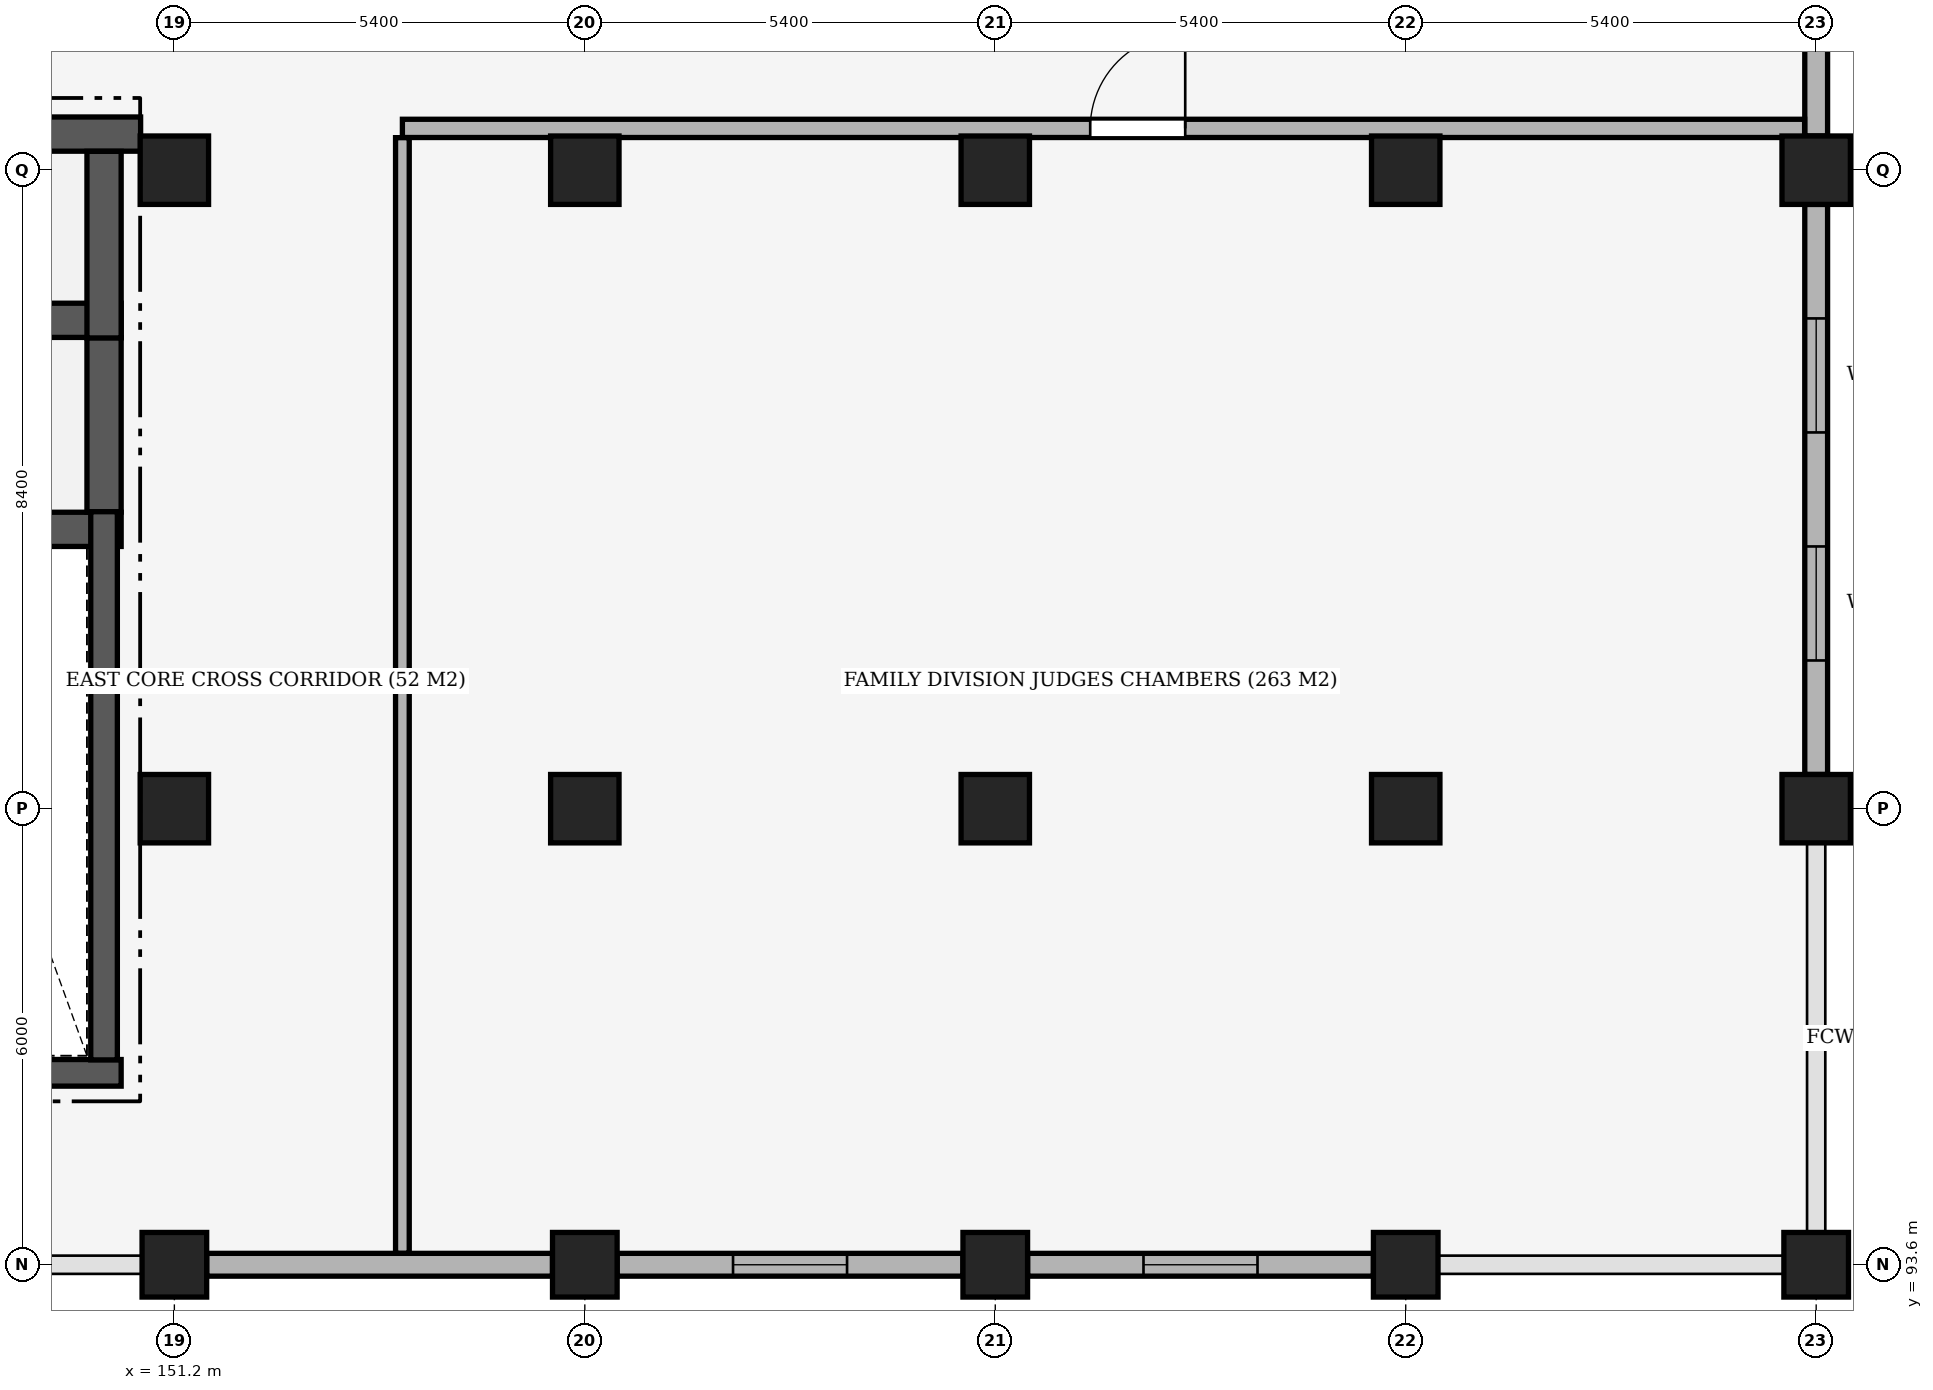
"""IFC4 building model, lengths in metres.
Left out: names, types, materials, properties, quantities, classifications, styles, units other than length and angle.
Written with IfcOpenShell. Run it as: python <this file> out.ifc"""

import sys

from ifc_helpers import new_model, si_unit, direction, frame, frame_2d, origin, origin_2d, place, context, subcontext, project, spatial, rectangle, extrude, element, fill, save


model = new_model("IFC4")
c1 = context("Model", 3, precision=1e-05, world=origin(), true_north=direction((0.0, 1.0)))
c2 = subcontext(c1, "Body", "Model", "MODEL_VIEW")
j1 = project(units=[si_unit("LENGTHUNIT", "METRE"), si_unit("PLANEANGLEUNIT", "RADIAN")], contexts=[c1])
p1 = place(None, origin())
s1 = spatial("IfcSite", under=j1, at=p1, CompositionType="ELEMENT")
p2 = place(p1, origin())
s2 = spatial("IfcBuilding", under=s1, at=p2, CompositionType="ELEMENT")
p3 = place(p2, frame((0.0, 0.0, 5.1)))
s3 = spatial("IfcBuildingStorey", under=s2, at=p3, CompositionType="ELEMENT", Elevation=5.1)
p4 = place(p3, frame((151.2, 93.6, 0.0), z_axis=(0.0, 0.0, 1.0), x_axis=(1.0, 0.0, 0.0)))
e1 = element("IfcColumn", 1, at=p4, inside=s3, PredefinedType="COLUMN", context=c2, shape_type="SweptSolid", body=[
    extrude(rectangle(XDim=0.85, YDim=0.85, at=origin_2d()), origin(), (0.0, 0.0, 1.0), 5.1),
])
for number, where, z_axis, x_axis in (
    (2, (151.2, 99.6, 0.0), (0.0, 0.0, 1.0), (1.0, 0.0, 0.0)),
    (3, (151.2, 108.0, 0.0), (0.0, 0.0, 1.0), (1.0, 0.0, 0.0)),
):
    element("IfcColumn", number, at=place(p3, frame(where, z_axis=z_axis, x_axis=x_axis)), inside=s3, PredefinedType="COLUMN", context=c2, shape_type="SweptSolid", body=[
        extrude(rectangle(XDim=0.9, YDim=0.9, at=origin_2d()), origin(), (0.0, 0.0, 1.0), 5.1),
    ])
p5 = place(p3, frame((156.6, 93.6, 0.0), z_axis=(0.0, 0.0, 1.0), x_axis=(1.0, 0.0, 0.0)))
e4 = element("IfcColumn", 4, at=p5, inside=s3, PredefinedType="COLUMN", context=c2, shape_type="SweptSolid", body=[
    extrude(rectangle(XDim=0.85, YDim=0.85, at=origin_2d()), origin(), (0.0, 0.0, 1.0), 5.1),
])
for number, where, z_axis, x_axis in (
    (5, (156.6, 99.6, 0.0), (0.0, 0.0, 1.0), (1.0, 0.0, 0.0)),
    (6, (156.6, 108.0, 0.0), (0.0, 0.0, 1.0), (1.0, 0.0, 0.0)),
):
    element("IfcColumn", number, at=place(p3, frame(where, z_axis=z_axis, x_axis=x_axis)), inside=s3, PredefinedType="COLUMN", context=c2, shape_type="SweptSolid", body=[
        extrude(rectangle(XDim=0.9, YDim=0.9, at=origin_2d()), origin(), (0.0, 0.0, 1.0), 5.1),
    ])
p6 = place(p3, frame((162.0, 93.6, 0.0), z_axis=(0.0, 0.0, 1.0), x_axis=(1.0, 0.0, 0.0)))
e7 = element("IfcColumn", 7, at=p6, inside=s3, PredefinedType="COLUMN", context=c2, shape_type="SweptSolid", body=[
    extrude(rectangle(XDim=0.85, YDim=0.85, at=origin_2d()), origin(), (0.0, 0.0, 1.0), 5.1),
])
for number, where, z_axis, x_axis in (
    (8, (162.0, 99.6, 0.0), (0.0, 0.0, 1.0), (1.0, 0.0, 0.0)),
    (9, (162.0, 108.0, 0.0), (0.0, 0.0, 1.0), (1.0, 0.0, 0.0)),
):
    element("IfcColumn", number, at=place(p3, frame(where, z_axis=z_axis, x_axis=x_axis)), inside=s3, PredefinedType="COLUMN", context=c2, shape_type="SweptSolid", body=[
        extrude(rectangle(XDim=0.9, YDim=0.9, at=origin_2d()), origin(), (0.0, 0.0, 1.0), 5.1),
    ])
p7 = place(p3, frame((167.4, 93.6, 0.0), z_axis=(0.0, 0.0, 1.0), x_axis=(1.0, 0.0, 0.0)))
e10 = element("IfcColumn", 10, at=p7, inside=s3, PredefinedType="COLUMN", context=c2, shape_type="SweptSolid", body=[
    extrude(rectangle(XDim=0.85, YDim=0.85, at=origin_2d()), origin(), (0.0, 0.0, 1.0), 5.1),
])
for number, where, z_axis, x_axis in (
    (11, (167.4, 99.6, 0.0), (0.0, 0.0, 1.0), (1.0, 0.0, 0.0)),
    (12, (167.4, 108.0, 0.0), (0.0, 0.0, 1.0), (1.0, 0.0, 0.0)),
):
    element("IfcColumn", number, at=place(p3, frame(where, z_axis=z_axis, x_axis=x_axis)), inside=s3, PredefinedType="COLUMN", context=c2, shape_type="SweptSolid", body=[
        extrude(rectangle(XDim=0.9, YDim=0.9, at=origin_2d()), origin(), (0.0, 0.0, 1.0), 5.1),
    ])
p8 = place(p3, frame((172.8, 93.6, 0.0), z_axis=(0.0, 0.0, 1.0), x_axis=(1.0, 0.0, 0.0)))
e13 = element("IfcColumn", 13, at=p8, inside=s3, PredefinedType="COLUMN", context=c2, shape_type="SweptSolid", body=[
    extrude(rectangle(XDim=0.85, YDim=0.85, at=origin_2d()), origin(), (0.0, 0.0, 1.0), 5.1),
])
for number, where, z_axis, x_axis in (
    (14, (172.8, 99.6, 0.0), (0.0, 0.0, 1.0), (1.0, 0.0, 0.0)),
    (15, (172.8, 108.0, 0.0), (0.0, 0.0, 1.0), (1.0, 0.0, 0.0)),
):
    element("IfcColumn", number, at=place(p3, frame(where, z_axis=z_axis, x_axis=x_axis)), inside=s3, PredefinedType="COLUMN", context=c2, shape_type="SweptSolid", body=[
        extrude(rectangle(XDim=0.9, YDim=0.9, at=origin_2d()), origin(), (0.0, 0.0, 1.0), 5.1),
    ])
p9 = place(p3, frame((172.8, 112.95, 0.0), z_axis=(0.0, 0.0, 1.0), x_axis=(0.0, -1.0, 0.0)))
e16 = element("IfcWall", 16, at=p9, inside=s3, PredefinedType="SOLIDWALL", context=c2, shape_type="SweptSolid", body=[
    extrude(rectangle(XDim=4.5, YDim=0.3, at=frame_2d((2.25, 0.0))), origin(), (0.0, 0.0, 1.0), 4.27),
])
p10 = place(p9, frame((1.5, 0.0, 0.9)))
e17 = element("IfcOpeningElement", 17, at=p10, cuts=e16, PredefinedType="OPENING", context=c2, shape_type="SweptSolid", body=[
    extrude(rectangle(XDim=1.5, YDim=2.1, at=frame_2d((0.75, 1.05))), frame((0.0, 0.165, 0.0), z_axis=(0.0, -1.0, 0.0), x_axis=(1.0, 0.0, 0.0)), (0.0, 0.0, 1.0), 0.33),
])
p11 = place(p3, frame((172.8, 107.55, 0.0), z_axis=(0.0, 0.0, 1.0), x_axis=(0.0, -1.0, 0.0)))
e18 = element("IfcWall", 18, at=p11, inside=s3, PredefinedType="SOLIDWALL", context=c2, shape_type="SweptSolid", body=[
    extrude(rectangle(XDim=7.5, YDim=0.3, at=frame_2d((3.75, 0.0))), origin(), (0.0, 0.0, 1.0), 4.02),
])
p12 = place(p11, frame((1.5, 0.0, 0.9)))
e19 = element("IfcOpeningElement", 19, at=p12, cuts=e18, PredefinedType="OPENING", context=c2, shape_type="SweptSolid", body=[
    extrude(rectangle(XDim=1.5, YDim=2.1, at=frame_2d((0.75, 1.05))), frame((0.0, 0.165, 0.0), z_axis=(0.0, -1.0, 0.0), x_axis=(1.0, 0.0, 0.0)), (0.0, 0.0, 1.0), 0.33),
])
p13 = place(p11, frame((4.5, 0.0, 0.9)))
e20 = element("IfcOpeningElement", 20, at=p13, cuts=e18, PredefinedType="OPENING", context=c2, shape_type="SweptSolid", body=[
    extrude(rectangle(XDim=1.5, YDim=2.1, at=frame_2d((0.75, 1.05))), frame((0.0, 0.165, 0.0), z_axis=(0.0, -1.0, 0.0), x_axis=(1.0, 0.0, 0.0)), (0.0, 0.0, 1.0), 0.33),
])
p14 = place(p3, frame((166.975, 93.6, 0.0), z_axis=(0.0, 0.0, 1.0), x_axis=(-1.0, 0.0, 0.0)))
e21 = element("IfcWall", 21, at=p14, inside=s3, PredefinedType="SOLIDWALL", context=c2, shape_type="SweptSolid", body=[
    extrude(rectangle(XDim=4.55, YDim=0.3, at=frame_2d((2.275, 0.0))), origin(), (0.0, 0.0, 1.0), 4.22),
])
p15 = place(p14, frame((1.525, 0.0, 0.9)))
e22 = element("IfcOpeningElement", 22, at=p15, cuts=e21, PredefinedType="OPENING", context=c2, shape_type="SweptSolid", body=[
    extrude(rectangle(XDim=1.5, YDim=2.1, at=frame_2d((0.75, 1.05))), frame((0.0, 0.165, 0.0), z_axis=(0.0, -1.0, 0.0), x_axis=(1.0, 0.0, 0.0)), (0.0, 0.0, 1.0), 0.33),
])
p16 = place(p3, frame((161.575, 93.6, 0.0), z_axis=(0.0, 0.0, 1.0), x_axis=(-1.0, 0.0, 0.0)))
e23 = element("IfcWall", 23, at=p16, inside=s3, PredefinedType="SOLIDWALL", context=c2, shape_type="SweptSolid", body=[
    extrude(rectangle(XDim=4.55, YDim=0.3, at=frame_2d((2.275, 0.0))), origin(), (0.0, 0.0, 1.0), 4.22),
])
p17 = place(p16, frame((1.525, 0.0, 0.9)))
e24 = element("IfcOpeningElement", 24, at=p17, cuts=e23, PredefinedType="OPENING", context=c2, shape_type="SweptSolid", body=[
    extrude(rectangle(XDim=1.5, YDim=2.1, at=frame_2d((0.75, 1.05))), frame((0.0, 0.165, 0.0), z_axis=(0.0, -1.0, 0.0), x_axis=(1.0, 0.0, 0.0)), (0.0, 0.0, 1.0), 0.33),
])
p18 = place(p3, frame((156.175, 93.6, 0.0), z_axis=(0.0, 0.0, 1.0), x_axis=(-1.0, 0.0, 0.0)))
e25 = element("IfcWall", 25, at=p18, inside=s3, PredefinedType="SOLIDWALL", context=c2, shape_type="SweptSolid", body=[
    extrude(rectangle(XDim=4.55, YDim=0.3, at=frame_2d((2.275, 0.0))), origin(), (0.0, 0.0, 1.0), 4.22),
])
p19 = place(p3, frame((147.618, 103.275, 0.0), z_axis=(0.0, 0.0, 1.0), x_axis=(1.0, 0.0, 0.0)))
e26 = element("IfcWall", 26, at=p19, inside=s3, PredefinedType="SHEAR", context=c2, shape_type="SweptSolid", body=[
    extrude(rectangle(XDim=2.882, YDim=0.45, at=frame_2d((1.441, 0.0))), origin(), (0.0, 0.0, 1.0), 4.82),
])
p20 = place(p3, frame((147.1, 106.025, 0.0), z_axis=(0.0, 0.0, 1.0), x_axis=(1.0, 0.0, 0.0)))
e27 = element("IfcWall", 27, at=p20, inside=s3, PredefinedType="SHEAR", context=c2, shape_type="SweptSolid", body=[
    extrude(rectangle(XDim=3.4, YDim=0.45, at=frame_2d((1.7, 0.0))), origin(), (0.0, 0.0, 1.0), 4.82),
])
p21 = place(p3, frame((150.275, 103.502, 0.0), z_axis=(0.0, 0.0, 1.0), x_axis=(0.0, 1.0, 0.0)))
e28 = element("IfcWall", 28, at=p21, inside=s3, PredefinedType="SHEAR", context=c2, shape_type="SweptSolid", body=[
    extrude(rectangle(XDim=2.296, YDim=0.45, at=frame_2d((1.148, 0.0))), origin(), (0.0, 0.0, 1.0), 4.82),
])
p22 = place(p3, frame((147.1, 108.475, 0.0), z_axis=(0.0, 0.0, 1.0), x_axis=(1.0, 0.0, 0.0)))
e29 = element("IfcWall", 29, at=p22, inside=s3, PredefinedType="SHEAR", context=c2, shape_type="SweptSolid", body=[
    extrude(rectangle(XDim=3.656, YDim=0.45, at=frame_2d((1.828, 0.0))), origin(), (0.0, 0.0, 1.0), 4.82),
])
p23 = place(p3, frame((150.275, 105.793, 0.0), z_axis=(0.0, 0.0, 1.0), x_axis=(0.0, 1.0, 0.0)))
e30 = element("IfcWall", 30, at=p23, inside=s3, PredefinedType="SHEAR", context=c2, shape_type="SweptSolid", body=[
    extrude(rectangle(XDim=2.455, YDim=0.45, at=frame_2d((1.228, 0.0))), origin(), (0.0, 0.0, 1.0), 4.82),
])
p24 = place(p3, frame((147.65, 96.125, 0.0), z_axis=(0.0, 0.0, 1.0), x_axis=(1.0, 0.0, 0.0)))
e31 = element("IfcWall", 31, at=p24, inside=s3, PredefinedType="SHEAR", context=c2, shape_type="SweptSolid", body=[
    extrude(rectangle(XDim=2.85, YDim=0.35, at=frame_2d((1.425, 0.0))), origin(), (0.0, 0.0, 1.0), 4.82),
])
p25 = place(p3, frame((150.275, 96.295, 0.0), z_axis=(0.0, 0.0, 1.0), x_axis=(0.0, 1.0, 0.0)))
e32 = element("IfcWall", 32, at=p25, inside=s3, PredefinedType="SHEAR", context=c2, shape_type="SweptSolid", body=[
    extrude(rectangle(XDim=7.212, YDim=0.35, at=frame_2d((3.606, 0.0))), origin(), (0.0, 0.0, 1.0), 4.82),
])
p26 = place(p3, frame((154.2, 108.55, 0.0), z_axis=(0.0, 0.0, 1.0), x_axis=(1.0, 0.0, 0.0)))
e33 = element("IfcWall", 33, at=p26, inside=s3, PredefinedType="PARTITIONING", context=c2, shape_type="SweptSolid", body=[
    extrude(rectangle(XDim=18.448, YDim=0.24, at=frame_2d((9.224, 0.0))), origin(), (0.0, 0.0, 1.0), 4.27),
])
p27 = place(p26, frame((9.049, 0.0, 0.0)))
e34 = element("IfcOpeningElement", 34, at=p27, cuts=e33, PredefinedType="OPENING", context=c2, shape_type="SweptSolid", body=[
    extrude(rectangle(XDim=1.25, YDim=2.2, at=frame_2d((0.625, 1.1))), frame((0.0, 0.135, 0.0), z_axis=(0.0, -1.0, 0.0), x_axis=(1.0, 0.0, 0.0)), (0.0, 0.0, 1.0), 0.27),
])
p28 = place(p3, frame((154.2, 93.752, 0.0), z_axis=(0.0, 0.0, 1.0), x_axis=(0.0, 1.0, 0.0)))
e35 = element("IfcWall", 35, at=p28, inside=s3, PredefinedType="PARTITIONING", context=c2, shape_type="SweptSolid", body=[
    extrude(rectangle(XDim=14.676, YDim=0.18, at=frame_2d((7.338, 0.0))), origin(), (0.0, 0.0, 1.0), 4.22),
])
p29 = place(p12, origin())
e36 = element("IfcWindow", 36, at=p29, inside=s3, PartitioningType="SINGLE_PANEL", PredefinedType="WINDOW", context=c2, shape_type="SweptSolid", body=[
    extrude(rectangle(XDim=1.5, YDim=2.1, at=frame_2d((0.75, 1.05))), frame((0.0, 0.03, 0.0), z_axis=(0.0, -1.0, 0.0), x_axis=(1.0, 0.0, 0.0)), (0.0, 0.0, 1.0), 0.06),
])
fill(e19, e36)
p30 = place(p13, origin())
e37 = element("IfcWindow", 37, at=p30, inside=s3, PartitioningType="SINGLE_PANEL", PredefinedType="WINDOW", context=c2, shape_type="SweptSolid", body=[
    extrude(rectangle(XDim=1.5, YDim=2.1, at=frame_2d((0.75, 1.05))), frame((0.0, 0.03, 0.0), z_axis=(0.0, -1.0, 0.0), x_axis=(1.0, 0.0, 0.0)), (0.0, 0.0, 1.0), 0.06),
])
fill(e20, e37)
p31 = place(p15, origin())
e38 = element("IfcWindow", 38, at=p31, inside=s3, PartitioningType="SINGLE_PANEL", PredefinedType="WINDOW", context=c2, shape_type="SweptSolid", body=[
    extrude(rectangle(XDim=1.5, YDim=2.1, at=frame_2d((0.75, 1.05))), frame((0.0, 0.03, 0.0), z_axis=(0.0, -1.0, 0.0), x_axis=(1.0, 0.0, 0.0)), (0.0, 0.0, 1.0), 0.06),
])
fill(e22, e38)
p32 = place(p17, origin())
e39 = element("IfcWindow", 39, at=p32, inside=s3, PartitioningType="SINGLE_PANEL", PredefinedType="WINDOW", context=c2, shape_type="SweptSolid", body=[
    extrude(rectangle(XDim=1.5, YDim=2.1, at=frame_2d((0.75, 1.05))), frame((0.0, 0.03, 0.0), z_axis=(0.0, -1.0, 0.0), x_axis=(1.0, 0.0, 0.0)), (0.0, 0.0, 1.0), 0.06),
])
fill(e24, e39)
p33 = place(p27, origin())
e40 = element("IfcDoor", 40, at=p33, inside=s3, OperationType="SINGLE_SWING_RIGHT", PredefinedType="DOOR", context=c2, shape_type="SweptSolid", body=[
    extrude(rectangle(XDim=1.25, YDim=2.2, at=frame_2d((0.625, 1.1))), frame((0.0, 0.025, 0.0), z_axis=(0.0, -1.0, 0.0), x_axis=(1.0, 0.0, 0.0)), (0.0, 0.0, 1.0), 0.05),
])
fill(e34, e40)
save(model, sys.argv[1])
